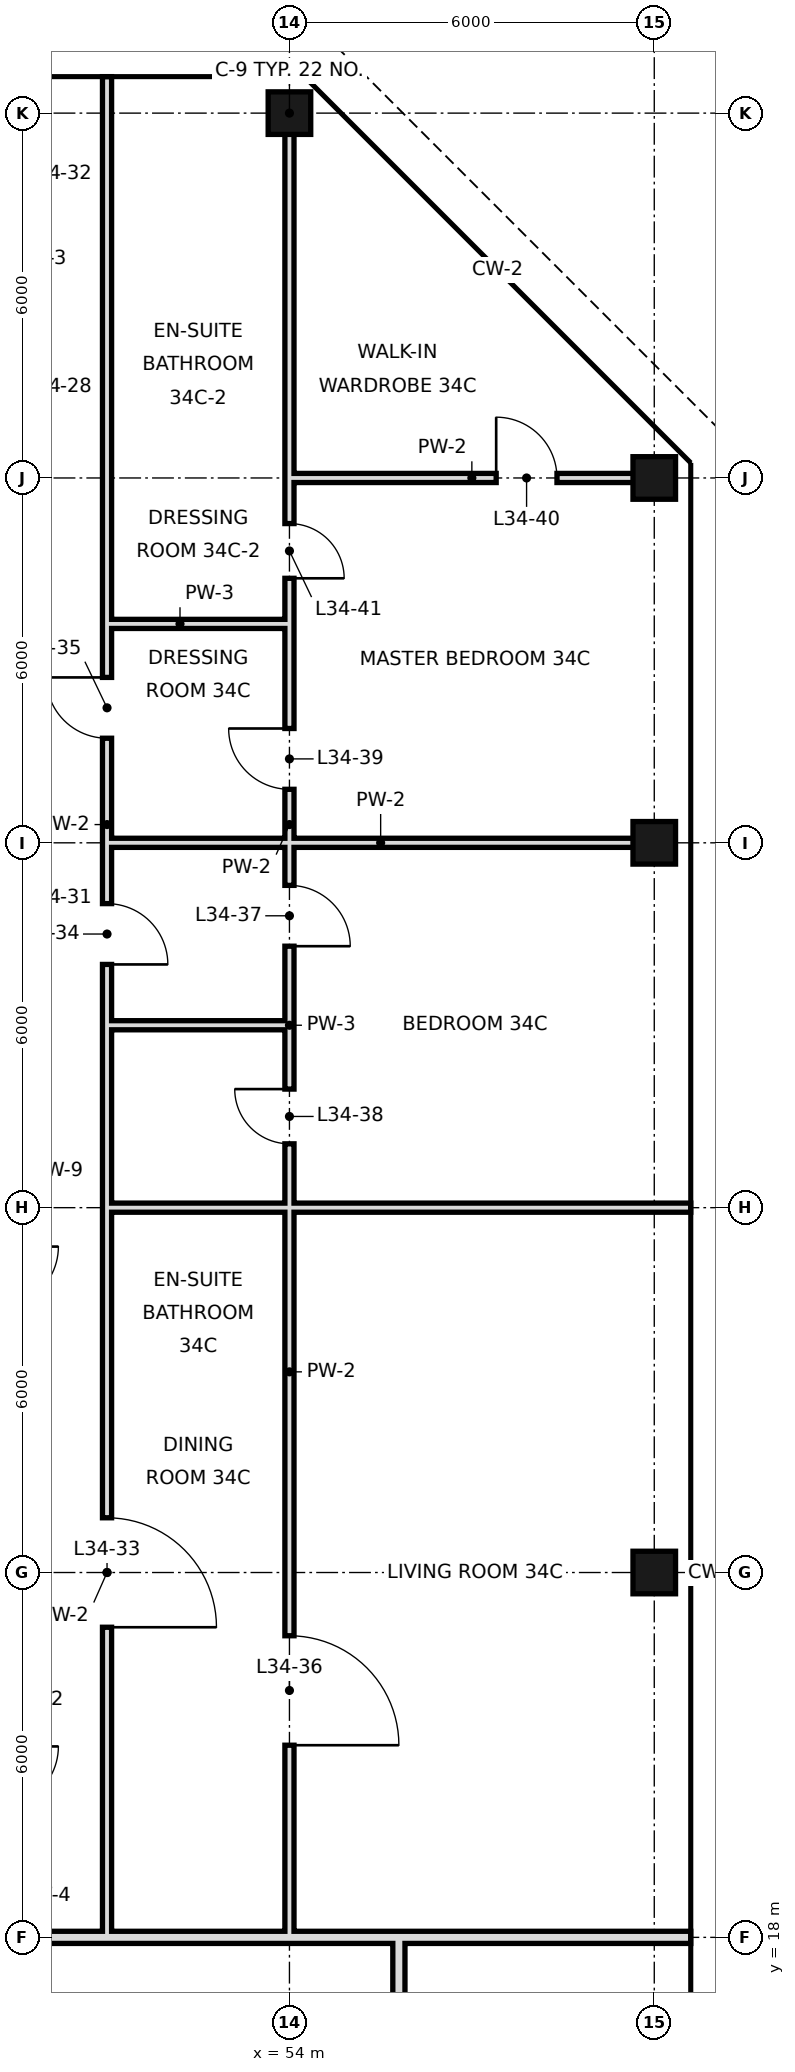
"""IFC4 building model, lengths in metres.
Left out: names, types, materials, properties, quantities, classifications, styles, units other than length and angle.
Written with IfcOpenShell. Run it as: python <this file> out.ifc"""

import sys

from ifc_helpers import new_model, si_unit, direction, frame, frame_2d, origin, origin_2d, place, context, subcontext, project, spatial, rectangle, hollow_rectangle, extrude, element, fill, save


model = new_model("IFC4")
c1 = context("Model", 3, precision=1e-05, world=origin(), true_north=direction((0.0, 1.0)))
c2 = subcontext(c1, "Body", "Model", "MODEL_VIEW")
j1 = project(units=[si_unit("LENGTHUNIT", "METRE"), si_unit("PLANEANGLEUNIT", "RADIAN")], contexts=[c1])
p1 = place(None, origin())
s1 = spatial("IfcSite", under=j1, at=p1, CompositionType="ELEMENT")
p2 = place(p1, origin())
s2 = spatial("IfcBuilding", under=s1, at=p2, CompositionType="ELEMENT")
p3 = place(p2, frame((0.0, 0.0, 151.0)))
s3 = spatial("IfcBuildingStorey", under=s2, at=p3, CompositionType="ELEMENT", Elevation=151.0)
for number, where, z_axis, x_axis in (
    (1, (54.0, 48.0, 0.0), (0.0, 0.0, 1.0), (1.0, 0.0, 0.0)),
    (2, (60.0, 24.0, 0.0), (0.0, 0.0, 1.0), (1.0, 0.0, 0.0)),
    (3, (60.0, 36.0, 0.0), (0.0, 0.0, 1.0), (1.0, 0.0, 0.0)),
    (4, (60.0, 42.0, 0.0), (0.0, 0.0, 1.0), (1.0, 0.0, 0.0)),
):
    element("IfcColumn", number, at=place(p3, frame(where, z_axis=z_axis, x_axis=x_axis)), inside=s3, PredefinedType="COLUMN", context=c2, shape_type="SweptSolid", body=[
        extrude(hollow_rectangle(XDim=0.7, YDim=0.7, WallThickness=0.036, at=origin_2d()), origin(), (0.0, 0.0, 1.0), 3.6),
    ])
p4 = place(p3, frame((51.0, 18.0, 0.0), z_axis=(0.0, 0.0, 1.0), x_axis=(0.0, 1.0, 0.0)))
e5 = element("IfcWall", 5, at=p4, inside=s3, PredefinedType="PARTITIONING", context=c2, shape_type="SweptSolid", body=[
    extrude(rectangle(XDim=12.0, YDim=0.15, at=frame_2d((6.0, 0.0))), origin(), (0.0, 0.0, 1.0), 3.42),
])
p5 = place(p4, frame((5.1, 0.0, 0.0)))
e6 = element("IfcOpeningElement", 6, at=p5, cuts=e5, PredefinedType="OPENING", context=c2, shape_type="SweptSolid", body=[
    extrude(rectangle(XDim=1.8, YDim=2.4, at=frame_2d((0.9, 1.2))), frame((0.0, 0.085, 0.0), z_axis=(0.0, -1.0, 0.0), x_axis=(1.0, 0.0, 0.0)), (0.0, 0.0, 1.0), 0.17),
])
p6 = place(p3, frame((51.0, 33.0, 0.0), z_axis=(0.0, 0.0, 1.0), x_axis=(0.0, 1.0, 0.0)))
e7 = element("IfcWall", 7, at=p6, inside=s3, PredefinedType="PARTITIONING", context=c2, shape_type="SweptSolid", body=[
    extrude(rectangle(XDim=6.6, YDim=0.15, at=frame_2d((3.3, 0.0))), origin(), (0.0, 0.0, 1.0), 3.42),
])
p7 = place(p6, frame((1.0, 0.0, 0.0)))
e8 = element("IfcOpeningElement", 8, at=p7, cuts=e7, PredefinedType="OPENING", context=c2, shape_type="SweptSolid", body=[
    extrude(rectangle(XDim=1.0, YDim=2.4, at=frame_2d((0.5, 1.2))), frame((0.0, 0.085, 0.0), z_axis=(0.0, -1.0, 0.0), x_axis=(1.0, 0.0, 0.0)), (0.0, 0.0, 1.0), 0.17),
])
p8 = place(p6, frame((4.72, 0.0, 0.0)))
e9 = element("IfcOpeningElement", 9, at=p8, cuts=e7, PredefinedType="OPENING", context=c2, shape_type="SweptSolid", body=[
    extrude(rectangle(XDim=1.0, YDim=2.4, at=frame_2d((0.5, 1.2))), frame((0.0, 0.085, 0.0), z_axis=(0.0, -1.0, 0.0), x_axis=(1.0, 0.0, 0.0)), (0.0, 0.0, 1.0), 0.17),
])
p9 = place(p3, frame((51.0, 30.0, 0.0), z_axis=(0.0, 0.0, 1.0), x_axis=(0.0, 1.0, 0.0)))
e10 = element("IfcWall", 10, at=p9, inside=s3, PredefinedType="PARTITIONING", context=c2, shape_type="SweptSolid", body=[
    extrude(rectangle(XDim=3.0, YDim=0.15, at=frame_2d((1.5, 0.0))), origin(), (0.0, 0.0, 1.0), 3.42),
])
p10 = place(p3, frame((51.0, 39.6, 0.0), z_axis=(0.0, 0.0, 1.0), x_axis=(0.0, 1.0, 0.0)))
e11 = element("IfcWall", 11, at=p10, inside=s3, PredefinedType="PARTITIONING", context=c2, shape_type="SweptSolid", body=[
    extrude(rectangle(XDim=9.0, YDim=0.15, at=frame_2d((4.5, 0.0))), origin(), (0.0, 0.0, 1.0), 3.42),
])
p11 = place(p3, frame((54.0, 18.0, 0.0), z_axis=(0.0, 0.0, 1.0), x_axis=(0.0, 1.0, 0.0)))
e12 = element("IfcWall", 12, at=p11, inside=s3, PredefinedType="PARTITIONING", context=c2, shape_type="SweptSolid", body=[
    extrude(rectangle(XDim=12.0, YDim=0.15, at=frame_2d((6.0, 0.0))), origin(), (0.0, 0.0, 1.0), 3.42),
])
p12 = place(p11, frame((3.16, 0.0, 0.0)))
e13 = element("IfcOpeningElement", 13, at=p12, cuts=e12, PredefinedType="OPENING", context=c2, shape_type="SweptSolid", body=[
    extrude(rectangle(XDim=1.8, YDim=2.4, at=frame_2d((0.9, 1.2))), frame((0.0, 0.085, 0.0), z_axis=(0.0, -1.0, 0.0), x_axis=(1.0, 0.0, 0.0)), (0.0, 0.0, 1.0), 0.17),
])
p13 = place(p3, frame((54.0, 33.0, 0.0), z_axis=(0.0, 0.0, 1.0), x_axis=(0.0, 1.0, 0.0)))
e14 = element("IfcWall", 14, at=p13, inside=s3, PredefinedType="PARTITIONING", context=c2, shape_type="SweptSolid", body=[
    extrude(rectangle(XDim=6.6, YDim=0.15, at=frame_2d((3.3, 0.0))), origin(), (0.0, 0.0, 1.0), 3.42),
])
p14 = place(p13, frame((1.3, 0.0, 0.0)))
e15 = element("IfcOpeningElement", 15, at=p14, cuts=e14, PredefinedType="OPENING", context=c2, shape_type="SweptSolid", body=[
    extrude(rectangle(XDim=1.0, YDim=2.4, at=frame_2d((0.5, 1.2))), frame((0.0, 0.085, 0.0), z_axis=(0.0, -1.0, 0.0), x_axis=(1.0, 0.0, 0.0)), (0.0, 0.0, 1.0), 0.17),
])
p15 = place(p13, frame((3.88, 0.0, 0.0)))
e16 = element("IfcOpeningElement", 16, at=p15, cuts=e14, PredefinedType="OPENING", context=c2, shape_type="SweptSolid", body=[
    extrude(rectangle(XDim=1.0, YDim=2.4, at=frame_2d((0.5, 1.2))), frame((0.0, 0.085, 0.0), z_axis=(0.0, -1.0, 0.0), x_axis=(1.0, 0.0, 0.0)), (0.0, 0.0, 1.0), 0.17),
])
p16 = place(p3, frame((54.0, 30.0, 0.0), z_axis=(0.0, 0.0, 1.0), x_axis=(0.0, 1.0, 0.0)))
e17 = element("IfcWall", 17, at=p16, inside=s3, PredefinedType="PARTITIONING", context=c2, shape_type="SweptSolid", body=[
    extrude(rectangle(XDim=3.0, YDim=0.15, at=frame_2d((1.5, 0.0))), origin(), (0.0, 0.0, 1.0), 3.42),
])
p17 = place(p16, frame((1.05, 0.0, 0.0)))
e18 = element("IfcOpeningElement", 18, at=p17, cuts=e17, PredefinedType="OPENING", context=c2, shape_type="SweptSolid", body=[
    extrude(rectangle(XDim=0.9, YDim=2.4, at=frame_2d((0.45, 1.2))), frame((0.0, 0.085, 0.0), z_axis=(0.0, -1.0, 0.0), x_axis=(1.0, 0.0, 0.0)), (0.0, 0.0, 1.0), 0.17),
])
p18 = place(p3, frame((54.0, 39.6, 0.0), z_axis=(0.0, 0.0, 1.0), x_axis=(0.0, 1.0, 0.0)))
e19 = element("IfcWall", 19, at=p18, inside=s3, PredefinedType="PARTITIONING", context=c2, shape_type="SweptSolid", body=[
    extrude(rectangle(XDim=8.4, YDim=0.15, at=frame_2d((4.2, 0.0))), origin(), (0.0, 0.0, 1.0), 3.42),
])
p19 = place(p18, frame((0.75, 0.0, 0.0)))
e20 = element("IfcOpeningElement", 20, at=p19, cuts=e19, PredefinedType="OPENING", context=c2, shape_type="SweptSolid", body=[
    extrude(rectangle(XDim=0.9, YDim=2.4, at=frame_2d((0.45, 1.2))), frame((0.0, 0.085, 0.0), z_axis=(0.0, -1.0, 0.0), x_axis=(1.0, 0.0, 0.0)), (0.0, 0.0, 1.0), 0.17),
])
p20 = place(p3, frame((55.8, 10.8, 0.0), z_axis=(0.0, 0.0, 1.0), x_axis=(0.0, 1.0, 0.0)))
e21 = element("IfcWall", 21, at=p20, inside=s3, PredefinedType="SOLIDWALL", context=c2, shape_type="SweptSolid", body=[
    extrude(rectangle(XDim=7.2, YDim=0.2, at=frame_2d((3.6, 0.0))), origin(), (0.0, 0.0, 1.0), 2.72),
])
p21 = place(p3, frame((55.8, 18.0, 0.0), z_axis=(0.0, 0.0, 1.0), x_axis=(1.0, 0.0, 0.0)))
e22 = element("IfcWall", 22, at=p21, inside=s3, PredefinedType="SOLIDWALL", context=c2, shape_type="SweptSolid", body=[
    extrude(rectangle(XDim=4.8, YDim=0.2, at=frame_2d((2.4, 0.0))), origin(), (0.0, 0.0, 1.0), 2.72),
])
p22 = place(p3, frame((44.9, 18.0, 0.0), z_axis=(0.0, 0.0, 1.0), x_axis=(1.0, 0.0, 0.0)))
e23 = element("IfcWall", 23, at=p22, inside=s3, PredefinedType="SOLIDWALL", context=c2, shape_type="SweptSolid", body=[
    extrude(rectangle(XDim=10.9, YDim=0.2, at=frame_2d((5.45, 0.0))), origin(), (0.0, 0.0, 1.0), 2.72),
])
p23 = place(p3, frame((54.0, 30.0, 0.0), z_axis=(0.0, 0.0, 1.0), x_axis=(1.0, 0.0, 0.0)))
e24 = element("IfcWall", 24, at=p23, inside=s3, PredefinedType="PARTITIONING", context=c2, shape_type="SweptSolid", body=[
    extrude(rectangle(XDim=6.6, YDim=0.15, at=frame_2d((3.3, 0.0))), origin(), (0.0, 0.0, 1.0), 2.72),
])
p24 = place(p3, frame((51.0, 30.0, 0.0), z_axis=(0.0, 0.0, 1.0), x_axis=(1.0, 0.0, 0.0)))
e25 = element("IfcWall", 25, at=p24, inside=s3, PredefinedType="PARTITIONING", context=c2, shape_type="SweptSolid", body=[
    extrude(rectangle(XDim=3.0, YDim=0.15, at=frame_2d((1.5, 0.0))), origin(), (0.0, 0.0, 1.0), 2.72),
])
p25 = place(p3, frame((51.0, 33.0, 0.0), z_axis=(0.0, 0.0, 1.0), x_axis=(1.0, 0.0, 0.0)))
e26 = element("IfcWall", 26, at=p25, inside=s3, PredefinedType="PARTITIONING", context=c2, shape_type="SweptSolid", body=[
    extrude(rectangle(XDim=3.0, YDim=0.15, at=frame_2d((1.5, 0.0))), origin(), (0.0, 0.0, 1.0), 3.42),
])
p26 = place(p3, frame((51.0, 36.0, 0.0), z_axis=(0.0, 0.0, 1.0), x_axis=(1.0, 0.0, 0.0)))
e27 = element("IfcWall", 27, at=p26, inside=s3, PredefinedType="PARTITIONING", context=c2, shape_type="SweptSolid", body=[
    extrude(rectangle(XDim=9.0, YDim=0.15, at=frame_2d((4.5, 0.0))), origin(), (0.0, 0.0, 1.0), 2.72),
])
p27 = place(p3, frame((51.0, 39.6, 0.0), z_axis=(0.0, 0.0, 1.0), x_axis=(1.0, 0.0, 0.0)))
e28 = element("IfcWall", 28, at=p27, inside=s3, PredefinedType="PARTITIONING", context=c2, shape_type="SweptSolid", body=[
    extrude(rectangle(XDim=3.0, YDim=0.15, at=frame_2d((1.5, 0.0))), origin(), (0.0, 0.0, 1.0), 3.42),
])
p28 = place(p3, frame((54.0, 42.0, 0.0), z_axis=(0.0, 0.0, 1.0), x_axis=(1.0, 0.0, 0.0)))
e29 = element("IfcWall", 29, at=p28, inside=s3, PredefinedType="PARTITIONING", context=c2, shape_type="SweptSolid", body=[
    extrude(rectangle(XDim=6.0, YDim=0.15, at=frame_2d((3.0, 0.0))), origin(), (0.0, 0.0, 1.0), 2.72),
])
p29 = place(p28, frame((3.4, 0.0, 0.0)))
e30 = element("IfcOpeningElement", 30, at=p29, cuts=e29, PredefinedType="OPENING", context=c2, shape_type="SweptSolid", body=[
    extrude(rectangle(XDim=1.0, YDim=2.4, at=frame_2d((0.5, 1.2))), frame((0.0, 0.085, 0.0), z_axis=(0.0, -1.0, 0.0), x_axis=(1.0, 0.0, 0.0)), (0.0, 0.0, 1.0), 0.17),
])
p30 = place(p5, frame((1.8, 0.0, 0.0), z_axis=(0.0, 0.0, 1.0), x_axis=(-1.0, 0.0, 0.0)))
e31 = element("IfcDoor", 31, at=p30, inside=s3, OperationType="SINGLE_SWING_RIGHT", PredefinedType="DOOR", context=c2, shape_type="SweptSolid", body=[
    extrude(rectangle(XDim=1.8, YDim=2.4, at=frame_2d((0.9, 1.2))), frame((0.0, 0.025, 0.0), z_axis=(0.0, -1.0, 0.0), x_axis=(1.0, 0.0, 0.0)), (0.0, 0.0, 1.0), 0.05),
])
fill(e6, e31)
p31 = place(p7, frame((1.0, 0.0, 0.0), z_axis=(0.0, 0.0, 1.0), x_axis=(-1.0, 0.0, 0.0)))
e32 = element("IfcDoor", 32, at=p31, inside=s3, OperationType="SINGLE_SWING_RIGHT", PredefinedType="DOOR", context=c2, shape_type="SweptSolid", body=[
    extrude(rectangle(XDim=1.0, YDim=2.4, at=frame_2d((0.5, 1.2))), frame((0.0, 0.025, 0.0), z_axis=(0.0, -1.0, 0.0), x_axis=(1.0, 0.0, 0.0)), (0.0, 0.0, 1.0), 0.05),
])
fill(e8, e32)
p32 = place(p8, frame((1.0, 0.0, 0.0), z_axis=(0.0, 0.0, 1.0), x_axis=(-1.0, 0.0, 0.0)))
e33 = element("IfcDoor", 33, at=p32, inside=s3, OperationType="SINGLE_SWING_LEFT", PredefinedType="DOOR", context=c2, shape_type="SweptSolid", body=[
    extrude(rectangle(XDim=1.0, YDim=2.4, at=frame_2d((0.5, 1.2))), frame((0.0, 0.025, 0.0), z_axis=(0.0, -1.0, 0.0), x_axis=(1.0, 0.0, 0.0)), (0.0, 0.0, 1.0), 0.05),
])
fill(e9, e33)
p33 = place(p12, frame((1.8, 0.0, 0.0), z_axis=(0.0, 0.0, 1.0), x_axis=(-1.0, 0.0, 0.0)))
e34 = element("IfcDoor", 34, at=p33, inside=s3, OperationType="SINGLE_SWING_RIGHT", PredefinedType="DOOR", context=c2, shape_type="SweptSolid", body=[
    extrude(rectangle(XDim=1.8, YDim=2.4, at=frame_2d((0.9, 1.2))), frame((0.0, 0.025, 0.0), z_axis=(0.0, -1.0, 0.0), x_axis=(1.0, 0.0, 0.0)), (0.0, 0.0, 1.0), 0.05),
])
fill(e13, e34)
p34 = place(p14, frame((1.0, 0.0, 0.0), z_axis=(0.0, 0.0, 1.0), x_axis=(-1.0, 0.0, 0.0)))
e35 = element("IfcDoor", 35, at=p34, inside=s3, OperationType="SINGLE_SWING_RIGHT", PredefinedType="DOOR", context=c2, shape_type="SweptSolid", body=[
    extrude(rectangle(XDim=1.0, YDim=2.4, at=frame_2d((0.5, 1.2))), frame((0.0, 0.025, 0.0), z_axis=(0.0, -1.0, 0.0), x_axis=(1.0, 0.0, 0.0)), (0.0, 0.0, 1.0), 0.05),
])
fill(e15, e35)
p35 = place(p17, frame((0.9, 0.0, 0.0), z_axis=(0.0, 0.0, 1.0), x_axis=(-1.0, 0.0, 0.0)))
e36 = element("IfcDoor", 36, at=p35, inside=s3, OperationType="SINGLE_SWING_LEFT", PredefinedType="DOOR", context=c2, shape_type="SweptSolid", body=[
    extrude(rectangle(XDim=0.9, YDim=2.4, at=frame_2d((0.45, 1.2))), frame((0.0, 0.025, 0.0), z_axis=(0.0, -1.0, 0.0), x_axis=(1.0, 0.0, 0.0)), (0.0, 0.0, 1.0), 0.05),
])
fill(e18, e36)
p36 = place(p15, frame((1.0, 0.0, 0.0), z_axis=(0.0, 0.0, 1.0), x_axis=(-1.0, 0.0, 0.0)))
e37 = element("IfcDoor", 37, at=p36, inside=s3, OperationType="SINGLE_SWING_LEFT", PredefinedType="DOOR", context=c2, shape_type="SweptSolid", body=[
    extrude(rectangle(XDim=1.0, YDim=2.4, at=frame_2d((0.5, 1.2))), frame((0.0, 0.025, 0.0), z_axis=(0.0, -1.0, 0.0), x_axis=(1.0, 0.0, 0.0)), (0.0, 0.0, 1.0), 0.05),
])
fill(e16, e37)
p37 = place(p29, origin())
e38 = element("IfcDoor", 38, at=p37, inside=s3, OperationType="SINGLE_SWING_LEFT", PredefinedType="DOOR", context=c2, shape_type="SweptSolid", body=[
    extrude(rectangle(XDim=1.0, YDim=2.4, at=frame_2d((0.5, 1.2))), frame((0.0, 0.025, 0.0), z_axis=(0.0, -1.0, 0.0), x_axis=(1.0, 0.0, 0.0)), (0.0, 0.0, 1.0), 0.05),
])
fill(e30, e38)
p38 = place(p19, frame((0.9, 0.0, 0.0), z_axis=(0.0, 0.0, 1.0), x_axis=(-1.0, 0.0, 0.0)))
e39 = element("IfcDoor", 39, at=p38, inside=s3, OperationType="SINGLE_SWING_RIGHT", PredefinedType="DOOR", context=c2, shape_type="SweptSolid", body=[
    extrude(rectangle(XDim=0.9, YDim=2.4, at=frame_2d((0.45, 1.2))), frame((0.0, 0.025, 0.0), z_axis=(0.0, -1.0, 0.0), x_axis=(1.0, 0.0, 0.0)), (0.0, 0.0, 1.0), 0.05),
])
fill(e20, e39)
save(model, sys.argv[1])
